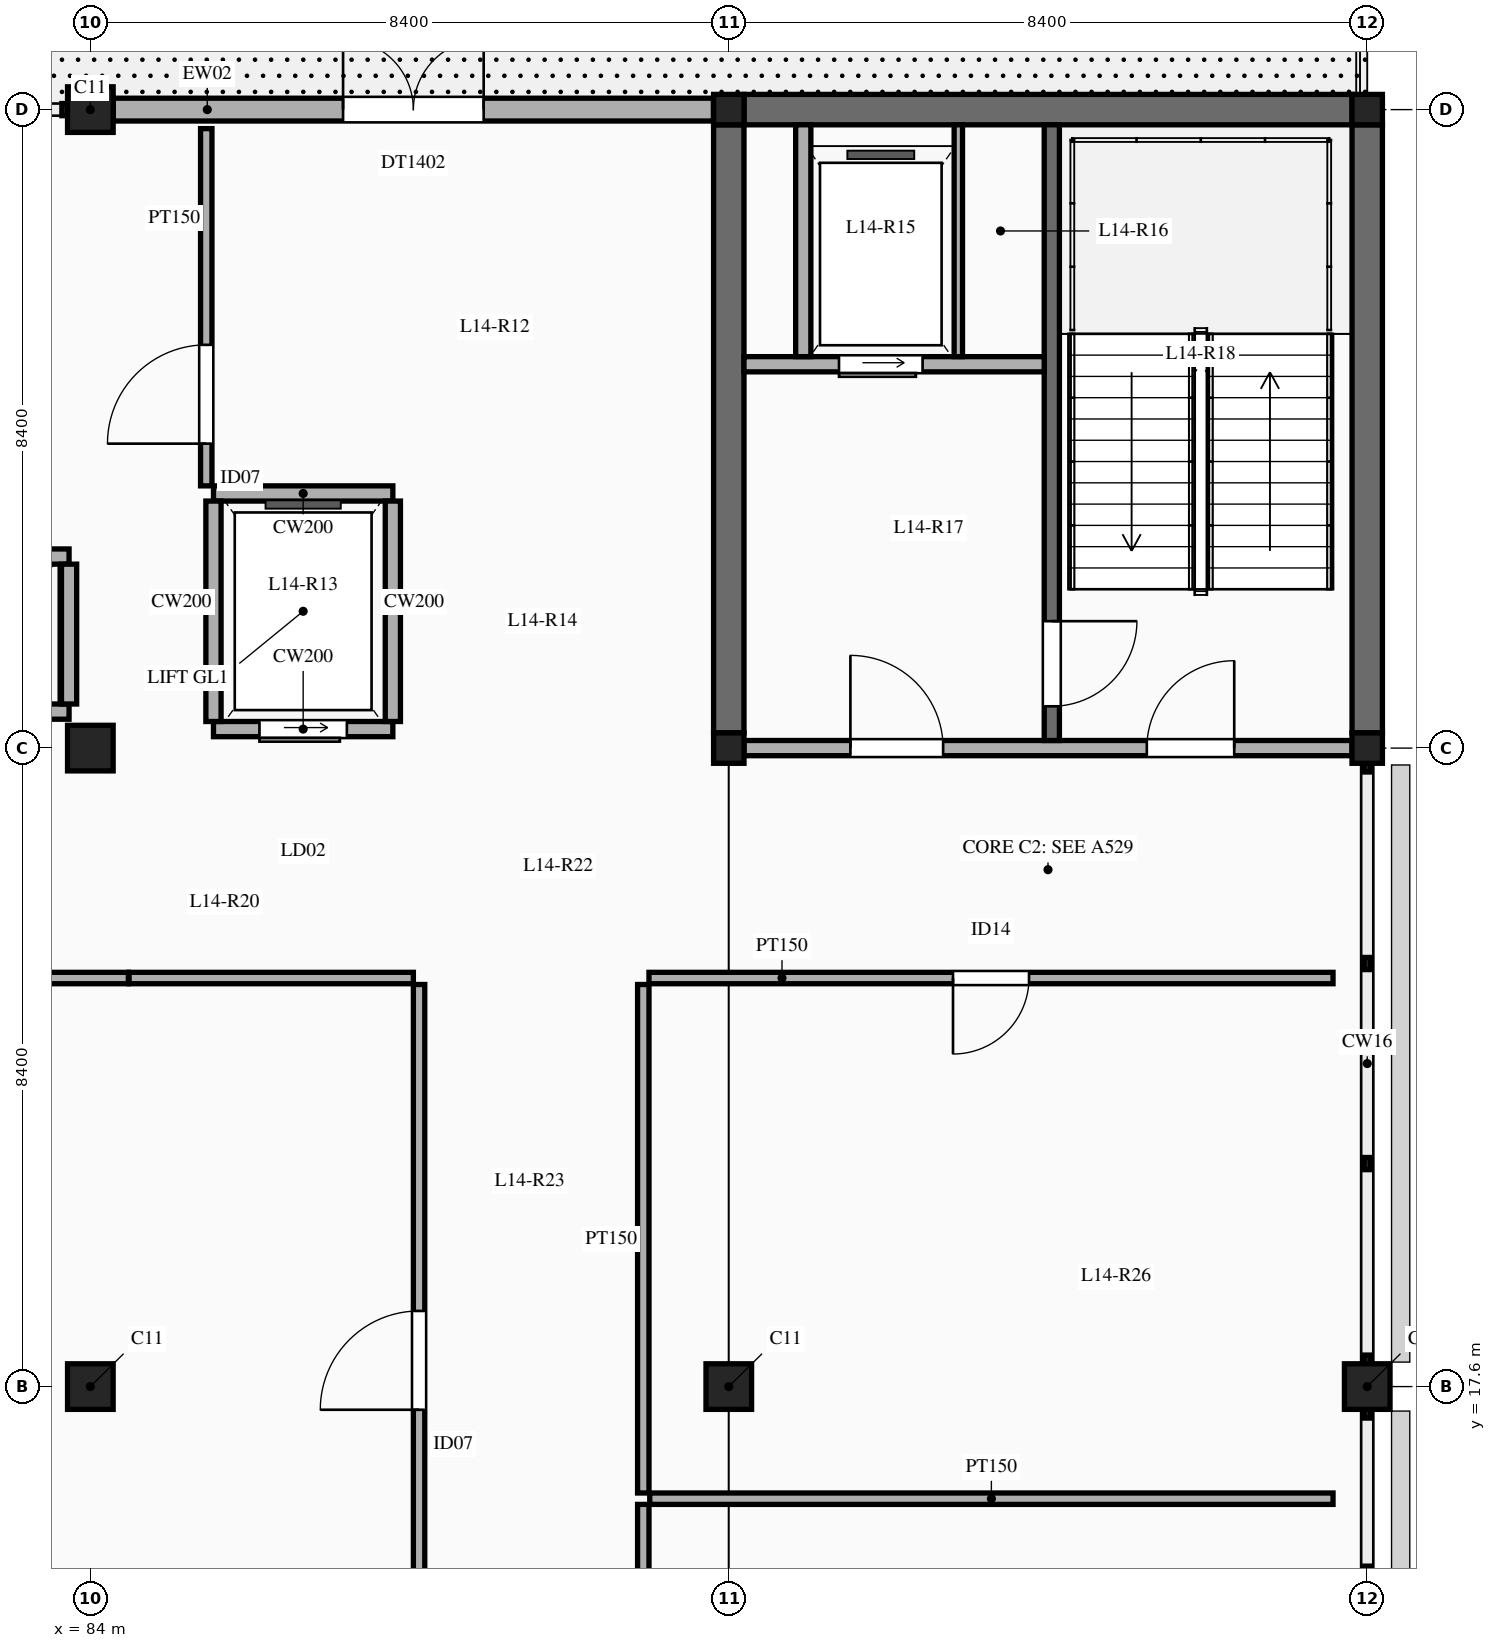
"""IFC4 building model, lengths in metres.
Left out: names, types, materials, properties, quantities, classifications, styles, units other than length and angle.
Written with IfcOpenShell. Run it as: python <this file> out.ifc"""

import sys

from ifc_helpers import new_model, si_unit, direction, frame, frame_2d, origin, origin_2d, place, context, subcontext, project, spatial, rectangle, extrude, element, fill, save


model = new_model("IFC4")
c1 = context("Model", 3, precision=1e-05, world=origin(), true_north=direction((0.0, 1.0)))
c2 = subcontext(c1, "Body", "Model", "MODEL_VIEW")
j1 = project(units=[si_unit("LENGTHUNIT", "METRE"), si_unit("PLANEANGLEUNIT", "RADIAN")], contexts=[c1])
p1 = place(None, origin())
s1 = spatial("IfcSite", under=j1, at=p1, CompositionType="ELEMENT")
p2 = place(p1, origin())
s2 = spatial("IfcBuilding", under=s1, at=p2, CompositionType="ELEMENT")
p3 = place(p2, frame((0.0, 0.0, 64.5)))
s3 = spatial("IfcBuildingStorey", under=s2, at=p3, CompositionType="ELEMENT", Elevation=64.5)
for number, where, z_axis, x_axis in (
    (1, (84.0, 17.6, 0.0), (0.0, 0.0, 1.0), (1.0, 0.0, 0.0)),
    (2, (84.0, 26.0, 0.0), (0.0, 0.0, 1.0), (1.0, 0.0, 0.0)),
    (3, (84.0, 34.4, 0.0), (0.0, 0.0, 1.0), (1.0, 0.0, 0.0)),
    (4, (92.4, 17.6, 0.0), (0.0, 0.0, 1.0), (1.0, 0.0, 0.0)),
):
    element("IfcColumn", number, at=place(p3, frame(where, z_axis=z_axis, x_axis=x_axis)), inside=s3, PredefinedType="COLUMN", context=c2, shape_type="SweptSolid", body=[
        extrude(rectangle(XDim=0.6, YDim=0.6, at=origin_2d()), origin(), (0.0, 0.0, 1.0), 4.5),
    ])
for number, where, z_axis, x_axis in (
    (5, (92.4, 26.0, 0.0), (0.0, 0.0, 1.0), (1.0, 0.0, 0.0)),
    (6, (92.4, 34.4, 0.0), (0.0, 0.0, 1.0), (1.0, 0.0, 0.0)),
):
    element("IfcColumn", number, at=place(p3, frame(where, z_axis=z_axis, x_axis=x_axis)), inside=s3, PredefinedType="COLUMN", context=c2, shape_type="SweptSolid", body=[
        extrude(rectangle(XDim=0.4, YDim=0.4, at=origin_2d()), origin(), (0.0, 0.0, 1.0), 4.5),
    ])
p4 = place(p3, frame((100.8, 17.6, 0.0), z_axis=(0.0, 0.0, 1.0), x_axis=(1.0, 0.0, 0.0)))
e7 = element("IfcColumn", 7, at=p4, inside=s3, PredefinedType="COLUMN", context=c2, shape_type="SweptSolid", body=[
    extrude(rectangle(XDim=0.6, YDim=0.6, at=origin_2d()), origin(), (0.0, 0.0, 1.0), 4.5),
])
for number, where, z_axis, x_axis in (
    (8, (100.8, 26.0, 0.0), (0.0, 0.0, 1.0), (1.0, 0.0, 0.0)),
    (9, (100.8, 34.4, 0.0), (0.0, 0.0, 1.0), (1.0, 0.0, 0.0)),
):
    element("IfcColumn", number, at=place(p3, frame(where, z_axis=z_axis, x_axis=x_axis)), inside=s3, PredefinedType="COLUMN", context=c2, shape_type="SweptSolid", body=[
        extrude(rectangle(XDim=0.4, YDim=0.4, at=origin_2d()), origin(), (0.0, 0.0, 1.0), 4.5),
    ])
for number, where, z_axis, x_axis in (
    (10, (92.4, 26.2, 0.0), (0.0, 0.0, 1.0), (0.0, 1.0, 0.0)),
    (11, (100.8, 26.2, 0.0), (0.0, 0.0, 1.0), (0.0, 1.0, 0.0)),
    (12, (92.6, 34.4, 0.0), (0.0, 0.0, 1.0), (1.0, 0.0, 0.0)),
):
    element("IfcWall", number, at=place(p3, frame(where, z_axis=z_axis, x_axis=x_axis)), inside=s3, PredefinedType="SHEAR", context=c2, shape_type="SweptSolid", body=[
        extrude(rectangle(XDim=8.0, YDim=0.4, at=frame_2d((4.0, 0.0))), origin(), (0.0, 0.0, 1.0), 4.5),
    ])
p5 = place(p3, frame((84.302, 34.4, 0.0), z_axis=(0.0, 0.0, 1.0), x_axis=(1.0, 0.0, 0.0)))
e13 = element("IfcWall", 13, at=p5, inside=s3, PredefinedType="SOLIDWALL", context=c2, shape_type="SweptSolid", body=[
    extrude(rectangle(XDim=7.896, YDim=0.3, at=frame_2d((3.948, 0.0))), origin(), (0.0, 0.0, 1.0), 3.55),
])
p6 = place(p5, frame((3.023, 0.0, 0.0)))
e14 = element("IfcOpeningElement", 14, at=p6, cuts=e13, PredefinedType="OPENING", context=c2, shape_type="SweptSolid", body=[
    extrude(rectangle(XDim=1.85, YDim=2.25, at=frame_2d((0.925, 1.125))), frame((0.0, 0.16, 0.0), z_axis=(0.0, -1.0, 0.0), x_axis=(1.0, 0.0, 0.0)), (0.0, 0.0, 1.0), 0.32),
])
p7 = place(p3, frame((92.6, 26.0, 0.0), z_axis=(0.0, 0.0, 1.0), x_axis=(1.0, 0.0, 0.0)))
e15 = element("IfcWall", 15, at=p7, inside=s3, PredefinedType="SOLIDWALL", context=c2, shape_type="SweptSolid", body=[
    extrude(rectangle(XDim=8.0, YDim=0.2, at=frame_2d((4.0, 0.0))), origin(), (0.0, 0.0, 1.0), 3.88),
])
p8 = place(p7, frame((1.4, 0.0, 0.0)))
e16 = element("IfcOpeningElement", 16, at=p8, cuts=e15, PredefinedType="OPENING", context=c2, shape_type="SweptSolid", body=[
    extrude(rectangle(XDim=1.22, YDim=2.15, at=frame_2d((0.61, 1.075))), frame((0.0, 0.11, 0.0), z_axis=(0.0, -1.0, 0.0), x_axis=(1.0, 0.0, 0.0)), (0.0, 0.0, 1.0), 0.22),
])
p9 = place(p7, frame((5.3, 0.0, 0.0)))
e17 = element("IfcOpeningElement", 17, at=p9, cuts=e15, PredefinedType="OPENING", context=c2, shape_type="SweptSolid", body=[
    extrude(rectangle(XDim=1.15, YDim=2.15, at=frame_2d((0.575, 1.075))), frame((0.0, 0.11, 0.0), z_axis=(0.0, -1.0, 0.0), x_axis=(1.0, 0.0, 0.0)), (0.0, 0.0, 1.0), 0.22),
])
p10 = place(p3, frame((96.65, 26.1, 0.0), z_axis=(0.0, 0.0, 1.0), x_axis=(0.0, 1.0, 0.0)))
e18 = element("IfcWall", 18, at=p10, inside=s3, PredefinedType="SOLIDWALL", context=c2, shape_type="SweptSolid", body=[
    extrude(rectangle(XDim=8.1, YDim=0.2, at=frame_2d((4.05, 0.0))), origin(), (0.0, 0.0, 1.0), 4.3),
])
p11 = place(p10, frame((0.45, 0.0, 0.0)))
e19 = element("IfcOpeningElement", 19, at=p11, cuts=e18, PredefinedType="OPENING", context=c2, shape_type="SweptSolid", body=[
    extrude(rectangle(XDim=1.12, YDim=2.15, at=frame_2d((0.56, 1.075))), frame((0.0, 0.11, 0.0), z_axis=(0.0, -1.0, 0.0), x_axis=(1.0, 0.0, 0.0)), (0.0, 0.0, 1.0), 0.22),
])
p12 = place(p3, frame((92.6, 31.05, 0.0), z_axis=(0.0, 0.0, 1.0), x_axis=(1.0, 0.0, 0.0)))
e20 = element("IfcWall", 20, at=p12, inside=s3, PredefinedType="SOLIDWALL", context=c2, shape_type="SweptSolid", body=[
    extrude(rectangle(XDim=3.95, YDim=0.2, at=frame_2d((1.975, 0.0))), origin(), (0.0, 0.0, 1.0), 4.3),
])
p13 = place(p12, frame((1.25, 0.0, 0.0)))
e21 = element("IfcOpeningElement", 21, at=p13, cuts=e20, PredefinedType="OPENING", context=c2, shape_type="SweptSolid", body=[
    extrude(rectangle(XDim=1.1, YDim=2.15, at=frame_2d((0.55, 1.075))), frame((0.0, 0.11, 0.0), z_axis=(0.0, -1.0, 0.0), x_axis=(1.0, 0.0, 0.0)), (0.0, 0.0, 1.0), 0.22),
])
p14 = place(p3, frame((95.42, 31.15, 0.0), z_axis=(0.0, 0.0, 1.0), x_axis=(0.0, 1.0, 0.0)))
e22 = element("IfcWall", 22, at=p14, inside=s3, PredefinedType="PARTITIONING", context=c2, shape_type="SweptSolid", body=[
    extrude(rectangle(XDim=3.05, YDim=0.11, at=frame_2d((1.525, 0.0))), origin(), (0.0, 0.0, 1.0), 4.3),
])
p15 = place(p3, frame((93.38, 31.15, 0.0), z_axis=(0.0, 0.0, 1.0), x_axis=(0.0, 1.0, 0.0)))
e23 = element("IfcWall", 23, at=p15, inside=s3, PredefinedType="SOLIDWALL", context=c2, shape_type="SweptSolid", body=[
    extrude(rectangle(XDim=3.05, YDim=0.2, at=frame_2d((1.525, 0.0))), origin(), (0.0, 0.0, 1.0), 4.3),
])
p16 = place(p3, frame((75.95, 26.48, 0.0), z_axis=(0.0, 0.0, 1.0), x_axis=(1.0, 0.0, 0.0)))
e24 = element("IfcWall", 24, at=p16, inside=s3, PredefinedType="SOLIDWALL", context=c2, shape_type="SweptSolid", body=[
    extrude(rectangle(XDim=7.77, YDim=0.2, at=frame_2d((3.885, 0.0))), origin(), (0.0, 0.0, 1.0), 4.3),
])
p17 = place(p16, frame((0.55, 0.0, 0.0)))
e25 = element("IfcOpeningElement", 25, at=p17, cuts=e24, PredefinedType="OPENING", context=c2, shape_type="SweptSolid", body=[
    extrude(rectangle(XDim=1.0, YDim=2.15, at=frame_2d((0.5, 1.075))), frame((0.0, 0.11, 0.0), z_axis=(0.0, -1.0, 0.0), x_axis=(1.0, 0.0, 0.0)), (0.0, 0.0, 1.0), 0.22),
])
p18 = place(p16, frame((3.35, 0.0, 0.0)))
e26 = element("IfcOpeningElement", 26, at=p18, cuts=e24, PredefinedType="OPENING", context=c2, shape_type="SweptSolid", body=[
    extrude(rectangle(XDim=1.0, YDim=2.15, at=frame_2d((0.5, 1.075))), frame((0.0, 0.11, 0.0), z_axis=(0.0, -1.0, 0.0), x_axis=(1.0, 0.0, 0.0)), (0.0, 0.0, 1.0), 0.22),
])
p19 = place(p16, frame((6.15, 0.0, 0.0)))
e27 = element("IfcOpeningElement", 27, at=p19, cuts=e24, PredefinedType="OPENING", context=c2, shape_type="SweptSolid", body=[
    extrude(rectangle(XDim=1.0, YDim=2.15, at=frame_2d((0.5, 1.075))), frame((0.0, 0.11, 0.0), z_axis=(0.0, -1.0, 0.0), x_axis=(1.0, 0.0, 0.0)), (0.0, 0.0, 1.0), 0.22),
])
p20 = place(p3, frame((75.95, 28.52, 0.0), z_axis=(0.0, 0.0, 1.0), x_axis=(1.0, 0.0, 0.0)))
e28 = element("IfcWall", 28, at=p20, inside=s3, PredefinedType="SOLIDWALL", context=c2, shape_type="SweptSolid", body=[
    extrude(rectangle(XDim=7.77, YDim=0.2, at=frame_2d((3.885, 0.0))), origin(), (0.0, 0.0, 1.0), 4.3),
])
p21 = place(p3, frame((83.72, 26.58, 0.0), z_axis=(0.0, 0.0, 1.0), x_axis=(0.0, 1.0, 0.0)))
e29 = element("IfcWall", 29, at=p21, inside=s3, PredefinedType="SOLIDWALL", context=c2, shape_type="SweptSolid", body=[
    extrude(rectangle(XDim=1.84, YDim=0.2, at=frame_2d((0.92, 0.0))), origin(), (0.0, 0.0, 1.0), 3.93),
])
p22 = place(p3, frame((85.62, 26.25, 0.0), z_axis=(0.0, 0.0, 1.0), x_axis=(1.0, 0.0, 0.0)))
e30 = element("IfcWall", 30, at=p22, inside=s3, PredefinedType="SOLIDWALL", context=c2, shape_type="SweptSolid", body=[
    extrude(rectangle(XDim=2.36, YDim=0.2, at=frame_2d((1.18, 0.0))), origin(), (0.0, 0.0, 1.0), 3.88),
])
p23 = place(p22, frame((0.605, 0.0, 0.0)))
e31 = element("IfcOpeningElement", 31, at=p23, cuts=e30, PredefinedType="OPENING", context=c2, shape_type="SweptSolid", body=[
    extrude(rectangle(XDim=1.15, YDim=2.2, at=frame_2d((0.575, 1.1))), frame((0.0, 0.11, 0.0), z_axis=(0.0, -1.0, 0.0), x_axis=(1.0, 0.0, 0.0)), (0.0, 0.0, 1.0), 0.22),
])
p24 = place(p3, frame((85.62, 29.35, 0.0), z_axis=(0.0, 0.0, 1.0), x_axis=(1.0, 0.0, 0.0)))
e32 = element("IfcWall", 32, at=p24, inside=s3, PredefinedType="SOLIDWALL", context=c2, shape_type="SweptSolid", body=[
    extrude(rectangle(XDim=2.36, YDim=0.2, at=frame_2d((1.18, 0.0))), origin(), (0.0, 0.0, 1.0), 4.3),
])
p25 = place(p3, frame((85.62, 26.35, 0.0), z_axis=(0.0, 0.0, 1.0), x_axis=(0.0, 1.0, 0.0)))
e33 = element("IfcWall", 33, at=p25, inside=s3, PredefinedType="SOLIDWALL", context=c2, shape_type="SweptSolid", body=[
    extrude(rectangle(XDim=2.9, YDim=0.2, at=frame_2d((1.45, 0.0))), origin(), (0.0, 0.0, 1.0), 4.3),
])
p26 = place(p3, frame((87.98, 26.35, 0.0), z_axis=(0.0, 0.0, 1.0), x_axis=(0.0, 1.0, 0.0)))
e34 = element("IfcWall", 34, at=p26, inside=s3, PredefinedType="SOLIDWALL", context=c2, shape_type="SweptSolid", body=[
    extrude(rectangle(XDim=2.9, YDim=0.2, at=frame_2d((1.45, 0.0))), origin(), (0.0, 0.0, 1.0), 4.03),
])
p27 = place(p3, frame((85.525, 29.45, 0.0), z_axis=(0.0, 0.0, 1.0), x_axis=(0.0, 1.0, 0.0)))
e35 = element("IfcWall", 35, at=p27, inside=s3, PredefinedType="PARTITIONING", context=c2, shape_type="SweptSolid", body=[
    extrude(rectangle(XDim=4.7, YDim=0.15, at=frame_2d((2.35, 0.0))), origin(), (0.0, 0.0, 1.0), 3.45),
])
p28 = place(p27, frame((0.555, 0.0, 0.0)))
e36 = element("IfcOpeningElement", 36, at=p28, cuts=e35, PredefinedType="OPENING", context=c2, shape_type="SweptSolid", body=[
    extrude(rectangle(XDim=1.3, YDim=2.25, at=frame_2d((0.65, 1.125))), frame((0.0, 0.085, 0.0), z_axis=(0.0, -1.0, 0.0), x_axis=(1.0, 0.0, 0.0)), (0.0, 0.0, 1.0), 0.17),
])
p29 = place(p3, frame((76.05, 22.975, 0.0), z_axis=(0.0, 0.0, 1.0), x_axis=(1.0, 0.0, 0.0)))
e37 = element("IfcWall", 37, at=p29, inside=s3, PredefinedType="PARTITIONING", context=c2, shape_type="SweptSolid", body=[
    extrude(rectangle(XDim=8.45, YDim=0.15, at=frame_2d((4.225, 0.0))), origin(), (0.0, 0.0, 1.0), 3.45),
])
p30 = place(p3, frame((84.51, 22.975, 0.0), z_axis=(0.0, 0.0, 1.0), x_axis=(1.0, 0.0, 0.0)))
e38 = element("IfcWall", 38, at=p30, inside=s3, PredefinedType="PARTITIONING", context=c2, shape_type="SweptSolid", body=[
    extrude(rectangle(XDim=3.74, YDim=0.15, at=frame_2d((1.87, 0.0))), origin(), (0.0, 0.0, 1.0), 3.45),
])
p31 = place(p3, frame((91.35, 22.975, 0.0), z_axis=(0.0, 0.0, 1.0), x_axis=(1.0, 0.0, 0.0)))
e39 = element("IfcWall", 39, at=p31, inside=s3, PredefinedType="PARTITIONING", context=c2, shape_type="SweptSolid", body=[
    extrude(rectangle(XDim=9.0, YDim=0.15, at=frame_2d((4.5, 0.0))), origin(), (0.0, 0.0, 1.0), 3.45),
])
p32 = place(p31, frame((4.0, 0.0, 0.0)))
e40 = element("IfcOpeningElement", 40, at=p32, cuts=e39, PredefinedType="OPENING", context=c2, shape_type="SweptSolid", body=[
    extrude(rectangle(XDim=1.0, YDim=2.15, at=frame_2d((0.5, 1.075))), frame((0.0, 0.085, 0.0), z_axis=(0.0, -1.0, 0.0), x_axis=(1.0, 0.0, 0.0)), (0.0, 0.0, 1.0), 0.17),
])
p33 = place(p3, frame((88.325, 13.0, 0.0), z_axis=(0.0, 0.0, 1.0), x_axis=(0.0, 1.0, 0.0)))
e41 = element("IfcWall", 41, at=p33, inside=s3, PredefinedType="PARTITIONING", context=c2, shape_type="SweptSolid", body=[
    extrude(rectangle(XDim=9.89, YDim=0.15, at=frame_2d((4.945, 0.0))), origin(), (0.0, 0.0, 1.0), 3.45),
])
p34 = place(p33, frame((4.295, 0.0, 0.0)))
e42 = element("IfcOpeningElement", 42, at=p34, cuts=e41, PredefinedType="OPENING", context=c2, shape_type="SweptSolid", body=[
    extrude(rectangle(XDim=1.3, YDim=2.25, at=frame_2d((0.65, 1.125))), frame((0.0, 0.085, 0.0), z_axis=(0.0, -1.0, 0.0), x_axis=(1.0, 0.0, 0.0)), (0.0, 0.0, 1.0), 0.17),
])
p35 = place(p3, frame((91.275, 16.2, 0.0), z_axis=(0.0, 0.0, 1.0), x_axis=(0.0, 1.0, 0.0)))
e43 = element("IfcWall", 43, at=p35, inside=s3, PredefinedType="PARTITIONING", context=c2, shape_type="SweptSolid", body=[
    extrude(rectangle(XDim=6.69, YDim=0.15, at=frame_2d((3.345, 0.0))), origin(), (0.0, 0.0, 1.0), 3.45),
])
p36 = place(p3, frame((91.275, 13.0, 0.0), z_axis=(0.0, 0.0, 1.0), x_axis=(0.0, 1.0, 0.0)))
e44 = element("IfcWall", 44, at=p36, inside=s3, PredefinedType="PARTITIONING", context=c2, shape_type="SweptSolid", body=[
    extrude(rectangle(XDim=3.05, YDim=0.15, at=frame_2d((1.525, 0.0))), origin(), (0.0, 0.0, 1.0), 3.45),
])
p37 = place(p36, frame((0.56, 0.0, 0.0)))
e45 = element("IfcOpeningElement", 45, at=p37, cuts=e44, PredefinedType="OPENING", context=c2, shape_type="SweptSolid", body=[
    extrude(rectangle(XDim=1.0, YDim=2.15, at=frame_2d((0.5, 1.075))), frame((0.0, 0.085, 0.0), z_axis=(0.0, -1.0, 0.0), x_axis=(1.0, 0.0, 0.0)), (0.0, 0.0, 1.0), 0.17),
])
p38 = place(p3, frame((91.36, 16.125, 0.0), z_axis=(0.0, 0.0, 1.0), x_axis=(1.0, 0.0, 0.0)))
e46 = element("IfcWall", 46, at=p38, inside=s3, PredefinedType="PARTITIONING", context=c2, shape_type="SweptSolid", body=[
    extrude(rectangle(XDim=8.99, YDim=0.15, at=frame_2d((4.495, 0.0))), origin(), (0.0, 0.0, 1.0), 3.45),
])
p39 = place(p6, origin())
e47 = element("IfcDoor", 47, at=p39, inside=s3, OperationType="DOUBLE_DOOR_SINGLE_SWING", PredefinedType="DOOR", context=c2, shape_type="SweptSolid", body=[
    extrude(rectangle(XDim=1.85, YDim=2.25, at=frame_2d((0.925, 1.125))), frame((0.0, 0.025, 0.0), z_axis=(0.0, -1.0, 0.0), x_axis=(1.0, 0.0, 0.0)), (0.0, 0.0, 1.0), 0.05),
])
fill(e14, e47)
p40 = place(p8, origin())
e48 = element("IfcDoor", 48, at=p40, inside=s3, OperationType="SINGLE_SWING_LEFT", PredefinedType="DOOR", context=c2, shape_type="SweptSolid", body=[
    extrude(rectangle(XDim=1.22, YDim=2.15, at=frame_2d((0.61, 1.075))), frame((0.0, 0.025, 0.0), z_axis=(0.0, -1.0, 0.0), x_axis=(1.0, 0.0, 0.0)), (0.0, 0.0, 1.0), 0.05),
])
fill(e16, e48)
p41 = place(p9, origin())
e49 = element("IfcDoor", 49, at=p41, inside=s3, OperationType="SINGLE_SWING_RIGHT", PredefinedType="DOOR", context=c2, shape_type="SweptSolid", body=[
    extrude(rectangle(XDim=1.15, YDim=2.15, at=frame_2d((0.575, 1.075))), frame((0.0, 0.025, 0.0), z_axis=(0.0, -1.0, 0.0), x_axis=(1.0, 0.0, 0.0)), (0.0, 0.0, 1.0), 0.05),
])
fill(e17, e49)
p42 = place(p11, frame((1.12, 0.0, 0.0), z_axis=(0.0, 0.0, 1.0), x_axis=(-1.0, 0.0, 0.0)))
e50 = element("IfcDoor", 50, at=p42, inside=s3, OperationType="SINGLE_SWING_LEFT", PredefinedType="DOOR", context=c2, shape_type="SweptSolid", body=[
    extrude(rectangle(XDim=1.12, YDim=2.15, at=frame_2d((0.56, 1.075))), frame((0.0, 0.025, 0.0), z_axis=(0.0, -1.0, 0.0), x_axis=(1.0, 0.0, 0.0)), (0.0, 0.0, 1.0), 0.05),
])
fill(e19, e50)
p43 = place(p13, frame((1.1, 0.0, 0.0), z_axis=(0.0, 0.0, 1.0), x_axis=(-1.0, 0.0, 0.0)))
e51 = element("IfcDoor", 51, at=p43, inside=s3, OperationType="SLIDING_TO_LEFT", PredefinedType="DOOR", context=c2, shape_type="SweptSolid", body=[
    extrude(rectangle(XDim=1.1, YDim=2.15, at=frame_2d((0.55, 1.075))), frame((0.0, 0.025, 0.0), z_axis=(0.0, -1.0, 0.0), x_axis=(1.0, 0.0, 0.0)), (0.0, 0.0, 1.0), 0.05),
])
fill(e21, e51)
p44 = place(p23, frame((1.15, 0.0, 0.0), z_axis=(0.0, 0.0, 1.0), x_axis=(-1.0, 0.0, 0.0)))
e52 = element("IfcDoor", 52, at=p44, inside=s3, OperationType="SLIDING_TO_LEFT", PredefinedType="DOOR", context=c2, shape_type="SweptSolid", body=[
    extrude(rectangle(XDim=1.15, YDim=2.2, at=frame_2d((0.575, 1.1))), frame((0.0, 0.025, 0.0), z_axis=(0.0, -1.0, 0.0), x_axis=(1.0, 0.0, 0.0)), (0.0, 0.0, 1.0), 0.05),
])
fill(e31, e52)
p45 = place(p28, origin())
e53 = element("IfcDoor", 53, at=p45, inside=s3, OperationType="SINGLE_SWING_LEFT", PredefinedType="DOOR", context=c2, shape_type="SweptSolid", body=[
    extrude(rectangle(XDim=1.3, YDim=2.25, at=frame_2d((0.65, 1.125))), frame((0.0, 0.025, 0.0), z_axis=(0.0, -1.0, 0.0), x_axis=(1.0, 0.0, 0.0)), (0.0, 0.0, 1.0), 0.05),
])
fill(e36, e53)
p46 = place(p34, origin())
e54 = element("IfcDoor", 54, at=p46, inside=s3, OperationType="SINGLE_SWING_LEFT", PredefinedType="DOOR", context=c2, shape_type="SweptSolid", body=[
    extrude(rectangle(XDim=1.3, YDim=2.25, at=frame_2d((0.65, 1.125))), frame((0.0, 0.025, 0.0), z_axis=(0.0, -1.0, 0.0), x_axis=(1.0, 0.0, 0.0)), (0.0, 0.0, 1.0), 0.05),
])
fill(e42, e54)
p47 = place(p32, frame((1.0, 0.0, 0.0), z_axis=(0.0, 0.0, 1.0), x_axis=(-1.0, 0.0, 0.0)))
e55 = element("IfcDoor", 55, at=p47, inside=s3, OperationType="SINGLE_SWING_RIGHT", PredefinedType="DOOR", context=c2, shape_type="SweptSolid", body=[
    extrude(rectangle(XDim=1.0, YDim=2.15, at=frame_2d((0.5, 1.075))), frame((0.0, 0.025, 0.0), z_axis=(0.0, -1.0, 0.0), x_axis=(1.0, 0.0, 0.0)), (0.0, 0.0, 1.0), 0.05),
])
fill(e40, e55)
save(model, sys.argv[1])
